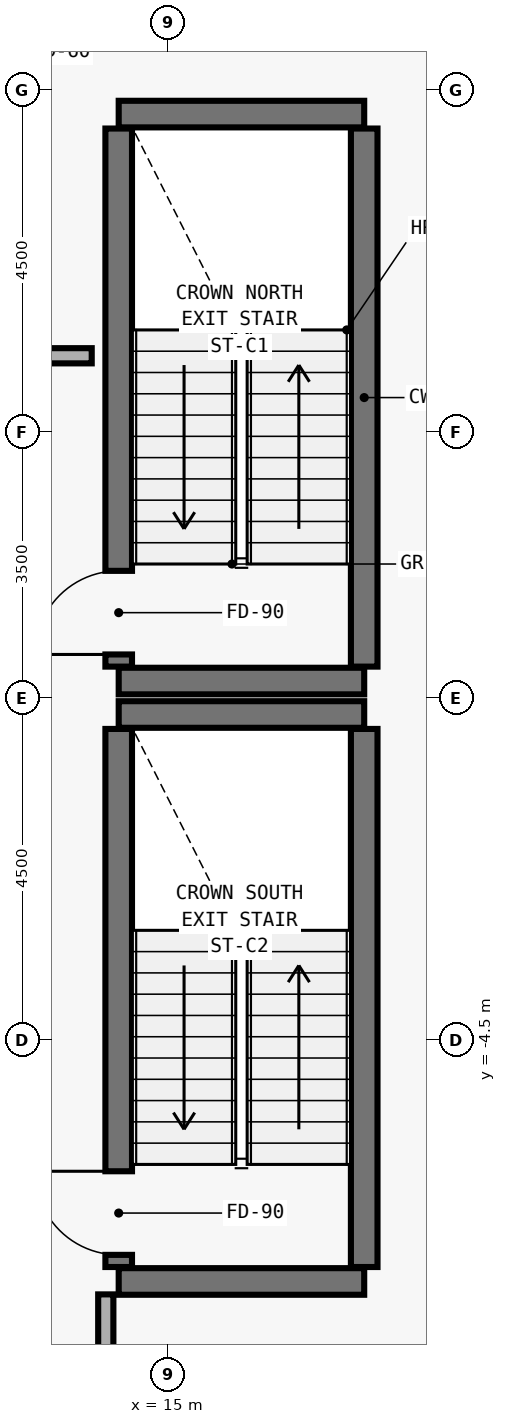
"""IFC4 building model, lengths in metres.
Left out: names, types, materials, properties, quantities, classifications, styles, units other than length and angle.
Written with IfcOpenShell. Run it as: python <this file> out.ifc"""

import sys

from ifc_helpers import new_model, si_unit, direction, frame, frame_2d, origin, place, context, subcontext, project, spatial, rectangle, extrude, element, fill, save


model = new_model("IFC4")
c1 = context("Model", 3, precision=1e-05, world=origin(), true_north=direction((0.0, 1.0)))
c2 = subcontext(c1, "Body", "Model", "MODEL_VIEW")
j1 = project(units=[si_unit("LENGTHUNIT", "METRE"), si_unit("PLANEANGLEUNIT", "RADIAN")], contexts=[c1])
p1 = place(None, origin())
s1 = spatial("IfcSite", under=j1, at=p1, CompositionType="ELEMENT")
p2 = place(p1, origin())
s2 = spatial("IfcBuilding", under=s1, at=p2, CompositionType="ELEMENT")
p3 = place(p2, frame((0.0, 0.0, 302.4)))
s3 = spatial("IfcBuildingStorey", under=s2, at=p3, CompositionType="ELEMENT", Elevation=302.4)
for number, where, z_axis, x_axis in (
    (1, (14.35, 0.22, 0.0), (0.0, 0.0, 1.0), (1.0, 0.0, 0.0)),
    (2, (14.35, 7.68, 0.0), (0.0, 0.0, 1.0), (1.0, 0.0, 0.0)),
):
    element("IfcWall", number, at=place(p3, frame(where, z_axis=z_axis, x_axis=x_axis)), inside=s3, PredefinedType="SHEAR", context=c2, shape_type="SweptSolid", body=[
        extrude(rectangle(XDim=3.23, YDim=0.35, at=frame_2d((1.615, 0.0))), origin(), (0.0, 0.0, 1.0), 4.192),
    ])
p4 = place(p3, frame((14.35, 0.41, 0.0), z_axis=(0.0, 0.0, 1.0), x_axis=(0.0, 1.0, 0.0)))
e3 = element("IfcWall", 3, at=p4, inside=s3, PredefinedType="SHEAR", context=c2, shape_type="SweptSolid", body=[
    extrude(rectangle(XDim=7.08, YDim=0.35, at=frame_2d((3.54, 0.0))), origin(), (0.0, 0.0, 1.0), 4.192),
])
p5 = place(p4, frame((0.16, 0.0, 0.0)))
e4 = element("IfcOpeningElement", 4, at=p5, cuts=e3, PredefinedType="OPENING", context=c2, shape_type="SweptSolid", body=[
    extrude(rectangle(XDim=1.1, YDim=2.15, at=frame_2d((0.55, 1.075))), frame((0.0, 0.185, 0.0), z_axis=(0.0, -1.0, 0.0), x_axis=(1.0, 0.0, 0.0)), (0.0, 0.0, 1.0), 0.37),
])
p6 = place(p3, frame((17.58, 0.41, 0.0), z_axis=(0.0, 0.0, 1.0), x_axis=(0.0, 1.0, 0.0)))
e5 = element("IfcWall", 5, at=p6, inside=s3, PredefinedType="SHEAR", context=c2, shape_type="SweptSolid", body=[
    extrude(rectangle(XDim=7.08, YDim=0.35, at=frame_2d((3.54, 0.0))), origin(), (0.0, 0.0, 1.0), 4.192),
])
for number, where, z_axis, x_axis in (
    (6, (14.35, -7.68, 0.0), (0.0, 0.0, 1.0), (1.0, 0.0, 0.0)),
    (7, (14.35, -0.22, 0.0), (0.0, 0.0, 1.0), (1.0, 0.0, 0.0)),
):
    element("IfcWall", number, at=place(p3, frame(where, z_axis=z_axis, x_axis=x_axis)), inside=s3, PredefinedType="SHEAR", context=c2, shape_type="SweptSolid", body=[
        extrude(rectangle(XDim=3.23, YDim=0.35, at=frame_2d((1.615, 0.0))), origin(), (0.0, 0.0, 1.0), 4.192),
    ])
p7 = place(p3, frame((14.35, -7.49, 0.0), z_axis=(0.0, 0.0, 1.0), x_axis=(0.0, 1.0, 0.0)))
e8 = element("IfcWall", 8, at=p7, inside=s3, PredefinedType="SHEAR", context=c2, shape_type="SweptSolid", body=[
    extrude(rectangle(XDim=7.08, YDim=0.35, at=frame_2d((3.54, 0.0))), origin(), (0.0, 0.0, 1.0), 4.192),
])
p8 = place(p7, frame((0.16, 0.0, 0.0)))
e9 = element("IfcOpeningElement", 9, at=p8, cuts=e8, PredefinedType="OPENING", context=c2, shape_type="SweptSolid", body=[
    extrude(rectangle(XDim=1.1, YDim=2.15, at=frame_2d((0.55, 1.075))), frame((0.0, 0.185, 0.0), z_axis=(0.0, -1.0, 0.0), x_axis=(1.0, 0.0, 0.0)), (0.0, 0.0, 1.0), 0.37),
])
p9 = place(p3, frame((17.58, -7.49, 0.0), z_axis=(0.0, 0.0, 1.0), x_axis=(0.0, 1.0, 0.0)))
e10 = element("IfcWall", 10, at=p9, inside=s3, PredefinedType="SHEAR", context=c2, shape_type="SweptSolid", body=[
    extrude(rectangle(XDim=7.08, YDim=0.35, at=frame_2d((3.54, 0.0))), origin(), (0.0, 0.0, 1.0), 4.192),
])
p10 = place(p3, frame((13.995, 4.5, 0.0), z_axis=(0.0, 0.0, 1.0), x_axis=(-1.0, 0.0, 0.0)))
e11 = element("IfcWall", 11, at=p10, inside=s3, PredefinedType="MOVABLE", context=c2, shape_type="SweptSolid", body=[
    extrude(rectangle(XDim=2.085, YDim=0.2, at=frame_2d((1.042, 0.0))), origin(), (0.0, 0.0, 1.0), 3.96),
])
p11 = place(p3, frame((14.18, -8.69, 0.0), z_axis=(0.0, 0.0, 1.0), x_axis=(0.0, 1.0, 0.0)))
e12 = element("IfcWall", 12, at=p11, inside=s3, PredefinedType="MOVABLE", context=c2, shape_type="SweptSolid", body=[
    extrude(rectangle(XDim=0.84, YDim=0.2, at=frame_2d((0.42, 0.0))), origin(), (0.0, 0.0, 1.0), 3.96),
])
p12 = place(p5, origin())
e13 = element("IfcDoor", 13, at=p12, inside=s3, OperationType="SINGLE_SWING_LEFT", PredefinedType="DOOR", context=c2, shape_type="SweptSolid", body=[
    extrude(rectangle(XDim=1.1, YDim=2.15, at=frame_2d((0.55, 1.075))), frame((0.0, 0.025, 0.0), z_axis=(0.0, -1.0, 0.0), x_axis=(1.0, 0.0, 0.0)), (0.0, 0.0, 1.0), 0.05),
])
fill(e4, e13)
p13 = place(p8, origin())
e14 = element("IfcDoor", 14, at=p13, inside=s3, OperationType="SINGLE_SWING_RIGHT", PredefinedType="DOOR", context=c2, shape_type="SweptSolid", body=[
    extrude(rectangle(XDim=1.1, YDim=2.15, at=frame_2d((0.55, 1.075))), frame((0.0, 0.025, 0.0), z_axis=(0.0, -1.0, 0.0), x_axis=(1.0, 0.0, 0.0)), (0.0, 0.0, 1.0), 0.05),
])
fill(e9, e14)
save(model, sys.argv[1])
